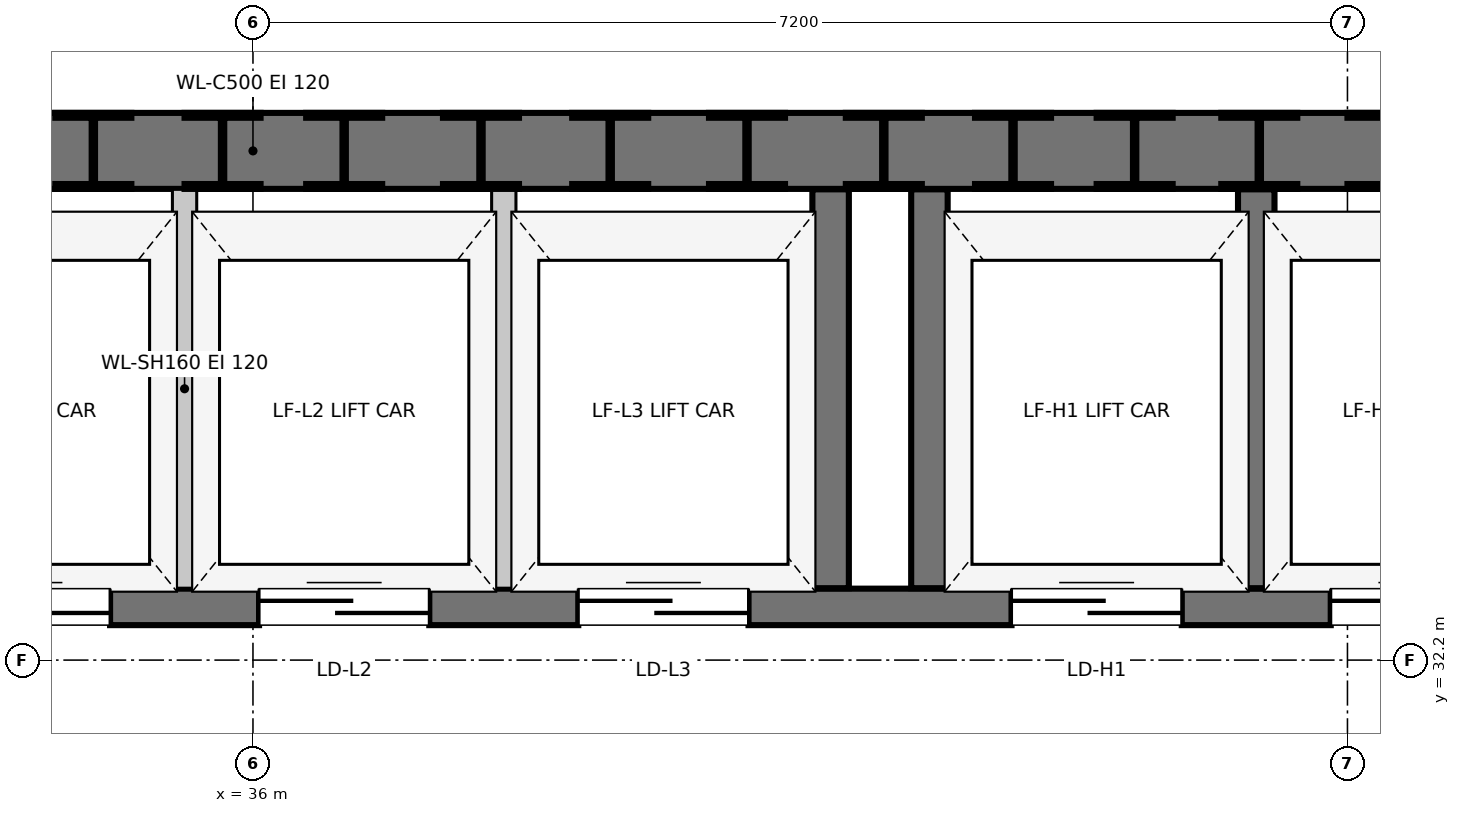
"""IFC4 building model, lengths in metres.
Left out: names, types, materials, properties, quantities, classifications, styles, units other than length and angle.
Written with IfcOpenShell. Run it as: python <this file> out.ifc"""

import sys

from ifc_helpers import new_model, si_unit, direction, frame, frame_2d, origin, origin_2d, place, context, subcontext, project, spatial, rectangle, i_section, extrude, element, fill, save


model = new_model("IFC4")
c1 = context("Model", 3, precision=1e-05, world=origin(), true_north=direction((0.0, 1.0)))
c2 = subcontext(c1, "Body", "Model", "MODEL_VIEW")
j1 = project(units=[si_unit("LENGTHUNIT", "METRE"), si_unit("PLANEANGLEUNIT", "RADIAN")], contexts=[c1])
p1 = place(None, origin())
s1 = spatial("IfcSite", under=j1, at=p1, CompositionType="ELEMENT")
p2 = place(p1, origin())
s2 = spatial("IfcBuilding", under=s1, at=p2, CompositionType="ELEMENT")
p3 = place(p2, frame((0.0, 0.0, 105.95)))
s3 = spatial("IfcBuildingStorey", under=s2, at=p3, CompositionType="ELEMENT", Elevation=105.95)
for number, where, z_axis, x_axis in (
    (1, (34.95, 35.55, 0.0), (0.0, 0.0, 1.0), (1.0, 0.0, 0.0)),
    (2, (36.6, 35.55, 0.0), (0.0, 0.0, 1.0), (1.0, 0.0, 0.0)),
    (3, (38.35, 35.55, 0.0), (0.0, 0.0, 1.0), (1.0, 0.0, 0.0)),
    (4, (40.15, 35.55, 0.0), (0.0, 0.0, 1.0), (1.0, 0.0, 0.0)),
    (5, (41.8, 35.55, 0.0), (0.0, 0.0, 1.0), (1.0, 0.0, 0.0)),
    (6, (43.45, 35.55, 0.0), (0.0, 0.0, 1.0), (1.0, 0.0, 0.0)),
    (7, (37.5, 35.55, 0.0), (0.0, 0.0, 1.0), (1.0, 0.0, 0.0)),
    (8, (42.62, 35.55, 0.0), (0.0, 0.0, 1.0), (1.0, 0.0, 0.0)),
    (9, (35.8, 35.55, 0.0), (0.0, 0.0, 1.0), (1.0, 0.0, 0.0)),
    (10, (39.25, 35.55, 0.0), (0.0, 0.0, 1.0), (1.0, 0.0, 0.0)),
    (11, (41.0, 35.55, 0.0), (0.0, 0.0, 1.0), (1.0, 0.0, 0.0)),
):
    element("IfcColumn", number, at=place(p3, frame(where, z_axis=z_axis, x_axis=x_axis)), inside=s3, PredefinedType="COLUMN", context=c2, shape_type="SweptSolid", body=[
        extrude(i_section(OverallWidth=0.5, OverallDepth=0.5, WebThickness=0.022, FlangeThickness=0.032, at=origin_2d()), origin(), (0.0, 0.0, 1.0), 4.5),
    ])
p4 = place(p3, frame((50.35, 35.55, 0.0), z_axis=(0.0, 0.0, 1.0), x_axis=(-1.0, 0.0, 0.0)))
e12 = element("IfcWall", 12, at=p4, inside=s3, PredefinedType="SHEAR", context=c2, shape_type="SweptSolid", body=[
    extrude(rectangle(XDim=28.7, YDim=0.5, at=frame_2d((14.35, 0.0))), origin(), (0.0, 0.0, 1.0), 4.5),
])
p5 = place(p3, frame((33.493, 32.55, 0.0), z_axis=(0.0, 0.0, 1.0), x_axis=(1.0, 0.0, 0.0)))
e13 = element("IfcWall", 13, at=p5, inside=s3, PredefinedType="SHEAR", context=c2, shape_type="SweptSolid", body=[
    extrude(rectangle(XDim=13.214, YDim=0.24, at=frame_2d((6.607, 0.0))), origin(), (0.0, 0.0, 1.0), 4.5),
])
p6 = place(p5, frame((0.447, 0.0, 0.0)))
e14 = element("IfcOpeningElement", 14, at=p6, cuts=e13, PredefinedType="OPENING", context=c2, shape_type="SweptSolid", body=[
    extrude(rectangle(XDim=1.12, YDim=2.0, at=frame_2d((0.56, 1.0))), frame((0.0, 0.13, 0.0), z_axis=(0.0, -1.0, 0.0), x_axis=(1.0, 0.0, 0.0)), (0.0, 0.0, 1.0), 0.26),
])
p7 = place(p5, frame((2.547, 0.0, 0.0)))
e15 = element("IfcOpeningElement", 15, at=p7, cuts=e13, PredefinedType="OPENING", context=c2, shape_type="SweptSolid", body=[
    extrude(rectangle(XDim=1.12, YDim=2.0, at=frame_2d((0.56, 1.0))), frame((0.0, 0.13, 0.0), z_axis=(0.0, -1.0, 0.0), x_axis=(1.0, 0.0, 0.0)), (0.0, 0.0, 1.0), 0.26),
])
p8 = place(p5, frame((4.647, 0.0, 0.0)))
e16 = element("IfcOpeningElement", 16, at=p8, cuts=e13, PredefinedType="OPENING", context=c2, shape_type="SweptSolid", body=[
    extrude(rectangle(XDim=1.12, YDim=2.0, at=frame_2d((0.56, 1.0))), frame((0.0, 0.13, 0.0), z_axis=(0.0, -1.0, 0.0), x_axis=(1.0, 0.0, 0.0)), (0.0, 0.0, 1.0), 0.26),
])
p9 = place(p5, frame((7.497, 0.0, 0.0)))
e17 = element("IfcOpeningElement", 17, at=p9, cuts=e13, PredefinedType="OPENING", context=c2, shape_type="SweptSolid", body=[
    extrude(rectangle(XDim=1.12, YDim=2.0, at=frame_2d((0.56, 1.0))), frame((0.0, 0.13, 0.0), z_axis=(0.0, -1.0, 0.0), x_axis=(1.0, 0.0, 0.0)), (0.0, 0.0, 1.0), 0.26),
])
p10 = place(p5, frame((9.597, 0.0, 0.0)))
e18 = element("IfcOpeningElement", 18, at=p10, cuts=e13, PredefinedType="OPENING", context=c2, shape_type="SweptSolid", body=[
    extrude(rectangle(XDim=1.12, YDim=2.0, at=frame_2d((0.56, 1.0))), frame((0.0, 0.13, 0.0), z_axis=(0.0, -1.0, 0.0), x_axis=(1.0, 0.0, 0.0)), (0.0, 0.0, 1.0), 0.26),
])
p11 = place(p5, frame((11.697, 0.0, 0.0)))
e19 = element("IfcOpeningElement", 19, at=p11, cuts=e13, PredefinedType="OPENING", context=c2, shape_type="SweptSolid", body=[
    extrude(rectangle(XDim=1.12, YDim=2.0, at=frame_2d((0.56, 1.0))), frame((0.0, 0.13, 0.0), z_axis=(0.0, -1.0, 0.0), x_axis=(1.0, 0.0, 0.0)), (0.0, 0.0, 1.0), 0.26),
])
for number, where, z_axis, x_axis in (
    (20, (39.8, 32.673, 0.0), (0.0, 0.0, 1.0), (0.0, 1.0, 0.0)),
    (21, (40.45, 32.673, 0.0), (0.0, 0.0, 1.0), (0.0, 1.0, 0.0)),
    (22, (42.6, 32.673, 0.0), (0.0, 0.0, 1.0), (0.0, 1.0, 0.0)),
):
    element("IfcWall", number, at=place(p3, frame(where, z_axis=z_axis, x_axis=x_axis)), inside=s3, PredefinedType="SHEAR", context=c2, shape_type="SweptSolid", body=[
        extrude(rectangle(XDim=2.624, YDim=0.24, at=frame_2d((1.312, 0.0))), origin(), (0.0, 0.0, 1.0), 4.5),
    ])
for number, where, z_axis, x_axis in (
    (23, (35.55, 32.673, 0.0), (0.0, 0.0, 1.0), (0.0, 1.0, 0.0)),
    (24, (37.65, 32.673, 0.0), (0.0, 0.0, 1.0), (0.0, 1.0, 0.0)),
):
    element("IfcWall", number, at=place(p3, frame(where, z_axis=z_axis, x_axis=x_axis)), inside=s3, PredefinedType="MOVABLE", context=c2, shape_type="SweptSolid", body=[
        extrude(rectangle(XDim=2.624, YDim=0.16, at=frame_2d((1.312, 0.0))), origin(), (0.0, 0.0, 1.0), 4.245),
    ])
p12 = place(p6, origin())
e25 = element("IfcDoor", 25, at=p12, inside=s3, OperationType="DOUBLE_DOOR_SLIDING", PredefinedType="USERDEFINED", context=c2, shape_type="SweptSolid", body=[
    extrude(rectangle(XDim=1.12, YDim=2.0, at=frame_2d((0.56, 1.0))), frame((0.0, 0.025, 0.0), z_axis=(0.0, -1.0, 0.0), x_axis=(1.0, 0.0, 0.0)), (0.0, 0.0, 1.0), 0.05),
])
fill(e14, e25)
p13 = place(p7, origin())
e26 = element("IfcDoor", 26, at=p13, inside=s3, OperationType="DOUBLE_DOOR_SLIDING", PredefinedType="USERDEFINED", context=c2, shape_type="SweptSolid", body=[
    extrude(rectangle(XDim=1.12, YDim=2.0, at=frame_2d((0.56, 1.0))), frame((0.0, 0.025, 0.0), z_axis=(0.0, -1.0, 0.0), x_axis=(1.0, 0.0, 0.0)), (0.0, 0.0, 1.0), 0.05),
])
fill(e15, e26)
p14 = place(p8, origin())
e27 = element("IfcDoor", 27, at=p14, inside=s3, OperationType="DOUBLE_DOOR_SLIDING", PredefinedType="USERDEFINED", context=c2, shape_type="SweptSolid", body=[
    extrude(rectangle(XDim=1.12, YDim=2.0, at=frame_2d((0.56, 1.0))), frame((0.0, 0.025, 0.0), z_axis=(0.0, -1.0, 0.0), x_axis=(1.0, 0.0, 0.0)), (0.0, 0.0, 1.0), 0.05),
])
fill(e16, e27)
p15 = place(p9, origin())
e28 = element("IfcDoor", 28, at=p15, inside=s3, OperationType="DOUBLE_DOOR_SLIDING", PredefinedType="USERDEFINED", context=c2, shape_type="SweptSolid", body=[
    extrude(rectangle(XDim=1.12, YDim=2.0, at=frame_2d((0.56, 1.0))), frame((0.0, 0.025, 0.0), z_axis=(0.0, -1.0, 0.0), x_axis=(1.0, 0.0, 0.0)), (0.0, 0.0, 1.0), 0.05),
])
fill(e17, e28)
p16 = place(p10, origin())
e29 = element("IfcDoor", 29, at=p16, inside=s3, OperationType="DOUBLE_DOOR_SLIDING", PredefinedType="USERDEFINED", context=c2, shape_type="SweptSolid", body=[
    extrude(rectangle(XDim=1.12, YDim=2.0, at=frame_2d((0.56, 1.0))), frame((0.0, 0.025, 0.0), z_axis=(0.0, -1.0, 0.0), x_axis=(1.0, 0.0, 0.0)), (0.0, 0.0, 1.0), 0.05),
])
fill(e18, e29)
save(model, sys.argv[1])
